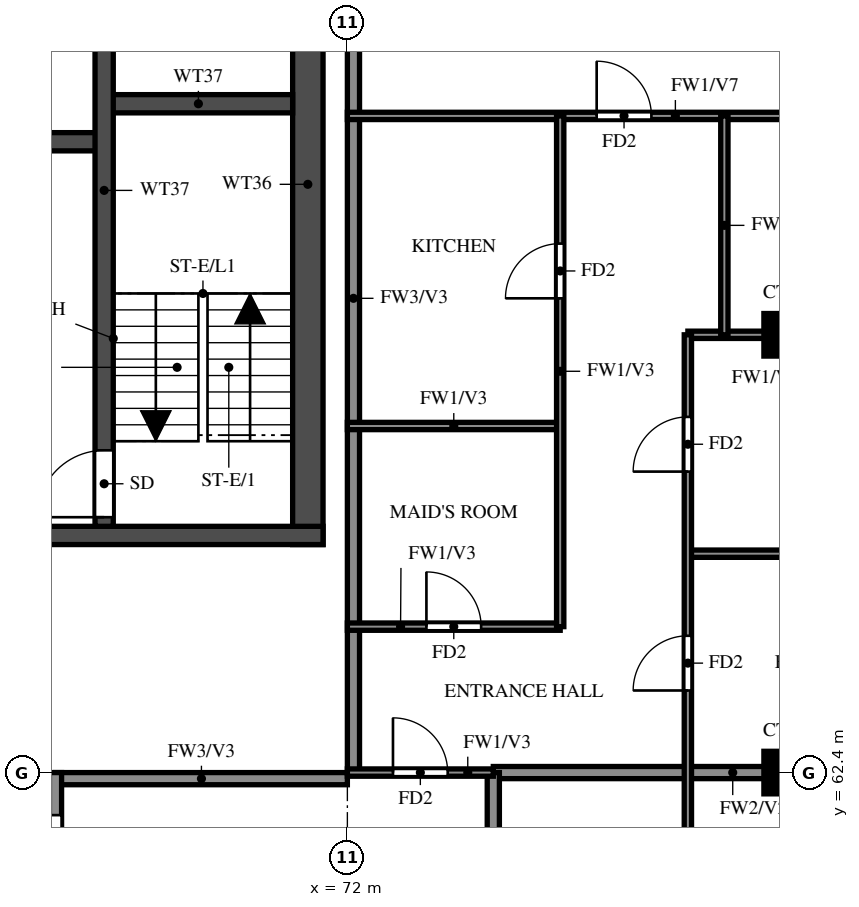
"""IFC4 building model, lengths in metres.
Left out: names, types, materials, properties, quantities, classifications, styles, units other than length and angle.
Written with IfcOpenShell. Run it as: python <this file> out.ifc"""

import sys

from ifc_helpers import new_model, si_unit, direction, frame, frame_2d, origin, origin_2d, place, context, subcontext, project, spatial, rectangle, extrude, source, transform, mapped, element, fill, save


model = new_model("IFC4")
c1 = context("Model", 3, precision=1e-05, world=origin(), true_north=direction((0.0, 1.0)))
c2 = subcontext(c1, "Body", "Model", "MODEL_VIEW")
j1 = project(units=[si_unit("LENGTHUNIT", "METRE"), si_unit("PLANEANGLEUNIT", "RADIAN")], contexts=[c1])
p1 = place(None, origin())
s1 = spatial("IfcSite", under=j1, at=p1, CompositionType="ELEMENT")
p2 = place(p1, origin())
s2 = spatial("IfcBuilding", under=s1, at=p2, CompositionType="ELEMENT")
p3 = place(p2, frame((0.0, 0.0, 264.0)))
s3 = spatial("IfcBuildingStorey", under=s2, at=p3, CompositionType="ELEMENT", Elevation=264.0)
m1 = source(origin(), c2, "Body", "SweptSolid", [
    extrude(rectangle(XDim=0.7, YDim=0.7, at=origin_2d()), origin(), (0.0, 0.0, 1.0), 3.22),
])
for number, where, z_axis, x_axis in (
    (1, (79.2, 62.4, 0.0), (0.0, 0.0, 1.0), (1.0, 0.0, 0.0)),
    (2, (79.2, 69.6, 0.0), (0.0, 0.0, 1.0), (1.0, 0.0, 0.0)),
):
    element("IfcColumn", number, at=place(p3, frame(where, z_axis=z_axis, x_axis=x_axis)), inside=s3, PredefinedType="COLUMN", context=c2, shape_type="MappedRepresentation", body=[
        mapped(m1, transform((0.0, 0.0, 0.0))),
    ])
p4 = place(p3, frame((71.35, 66.15, 0.0), z_axis=(0.0, 0.0, 1.0), x_axis=(0.0, 1.0, 0.0)))
e3 = element("IfcWall", 3, at=p4, inside=s3, PredefinedType="SHEAR", context=c2, shape_type="SweptSolid", body=[
    extrude(rectangle(XDim=11.85, YDim=0.5, at=frame_2d((5.925, 0.0))), origin(), (0.0, 0.0, 1.0), 3.22),
])
p5 = place(p3, frame((29.2, 66.3, 0.0), z_axis=(0.0, 0.0, 1.0), x_axis=(1.0, 0.0, 0.0)))
e4 = element("IfcWall", 4, at=p5, inside=s3, PredefinedType="SHEAR", context=c2, shape_type="SweptSolid", body=[
    extrude(rectangle(XDim=42.4, YDim=0.3, at=frame_2d((21.2, 0.0))), origin(), (0.0, 0.0, 1.0), 3.22),
])
p6 = place(p5, frame((1.425, 0.0, 0.0)))
e5 = element("IfcOpeningElement", 5, at=p6, cuts=e4, PredefinedType="OPENING", context=c2, shape_type="SweptSolid", body=[
    extrude(rectangle(XDim=1.1, YDim=2.1, at=frame_2d((0.55, 1.05))), frame((0.0, 0.16, 0.0), z_axis=(0.0, -1.0, 0.0), x_axis=(1.0, 0.0, 0.0)), (0.0, 0.0, 1.0), 0.32),
])
p7 = place(p5, frame((4.2, 0.0, 0.0)))
e6 = element("IfcOpeningElement", 6, at=p7, cuts=e4, PredefinedType="OPENING", context=c2, shape_type="SweptSolid", body=[
    extrude(rectangle(XDim=1.8, YDim=2.1, at=frame_2d((0.9, 1.05))), frame((0.0, 0.16, 0.0), z_axis=(0.0, -1.0, 0.0), x_axis=(1.0, 0.0, 0.0)), (0.0, 0.0, 1.0), 0.32),
])
p8 = place(p3, frame((32.8, 72.775, 0.0), z_axis=(0.0, 0.0, 1.0), x_axis=(1.0, 0.0, 0.0)))
e7 = element("IfcWall", 7, at=p8, inside=s3, PredefinedType="SHEAR", context=c2, shape_type="SweptSolid", body=[
    extrude(rectangle(XDim=35.2, YDim=0.3, at=frame_2d((17.6, 0.0))), origin(), (0.0, 0.0, 1.0), 3.22),
])
p9 = place(p8, frame((19.8, 0.0, 0.0)))
e8 = element("IfcOpeningElement", 8, at=p9, cuts=e7, PredefinedType="OPENING", context=c2, shape_type="SweptSolid", body=[
    extrude(rectangle(XDim=1.1, YDim=2.1, at=frame_2d((0.55, 1.05))), frame((0.0, 0.16, 0.0), z_axis=(0.0, -1.0, 0.0), x_axis=(1.0, 0.0, 0.0)), (0.0, 0.0, 1.0), 0.32),
])
p10 = place(p8, frame((27.725, 0.0, 0.0)))
e9 = element("IfcOpeningElement", 9, at=p10, cuts=e7, PredefinedType="OPENING", context=c2, shape_type="SweptSolid", body=[
    extrude(rectangle(XDim=1.1, YDim=2.1, at=frame_2d((0.55, 1.05))), frame((0.0, 0.16, 0.0), z_axis=(0.0, -1.0, 0.0), x_axis=(1.0, 0.0, 0.0)), (0.0, 0.0, 1.0), 0.32),
])
p11 = place(p8, frame((30.325, 0.0, 0.0)))
e10 = element("IfcOpeningElement", 10, at=p11, cuts=e7, PredefinedType="OPENING", context=c2, shape_type="SweptSolid", body=[
    extrude(rectangle(XDim=1.1, YDim=2.1, at=frame_2d((0.55, 1.05))), frame((0.0, 0.16, 0.0), z_axis=(0.0, -1.0, 0.0), x_axis=(1.0, 0.0, 0.0)), (0.0, 0.0, 1.0), 0.32),
])
p12 = place(p8, frame((3.825, 0.0, 0.0)))
e11 = element("IfcOpeningElement", 11, at=p12, cuts=e7, PredefinedType="OPENING", context=c2, shape_type="SweptSolid", body=[
    extrude(rectangle(XDim=1.1, YDim=2.1, at=frame_2d((0.55, 1.05))), frame((0.0, 0.16, 0.0), z_axis=(0.0, -1.0, 0.0), x_axis=(1.0, 0.0, 0.0)), (0.0, 0.0, 1.0), 0.32),
])
p13 = place(p8, frame((6.575, 0.0, 0.0)))
e12 = element("IfcOpeningElement", 12, at=p13, cuts=e7, PredefinedType="OPENING", context=c2, shape_type="SweptSolid", body=[
    extrude(rectangle(XDim=1.1, YDim=2.1, at=frame_2d((0.55, 1.05))), frame((0.0, 0.16, 0.0), z_axis=(0.0, -1.0, 0.0), x_axis=(1.0, 0.0, 0.0)), (0.0, 0.0, 1.0), 0.32),
])
p14 = place(p8, frame((9.325, 0.0, 0.0)))
e13 = element("IfcOpeningElement", 13, at=p14, cuts=e7, PredefinedType="OPENING", context=c2, shape_type="SweptSolid", body=[
    extrude(rectangle(XDim=1.1, YDim=2.1, at=frame_2d((0.55, 1.05))), frame((0.0, 0.16, 0.0), z_axis=(0.0, -1.0, 0.0), x_axis=(1.0, 0.0, 0.0)), (0.0, 0.0, 1.0), 0.32),
])
p15 = place(p8, frame((12.075, 0.0, 0.0)))
e14 = element("IfcOpeningElement", 14, at=p15, cuts=e7, PredefinedType="OPENING", context=c2, shape_type="SweptSolid", body=[
    extrude(rectangle(XDim=1.1, YDim=2.1, at=frame_2d((0.55, 1.05))), frame((0.0, 0.16, 0.0), z_axis=(0.0, -1.0, 0.0), x_axis=(1.0, 0.0, 0.0)), (0.0, 0.0, 1.0), 0.32),
])
p16 = place(p8, frame((14.825, 0.0, 0.0)))
e15 = element("IfcOpeningElement", 15, at=p16, cuts=e7, PredefinedType="OPENING", context=c2, shape_type="SweptSolid", body=[
    extrude(rectangle(XDim=1.1, YDim=2.1, at=frame_2d((0.55, 1.05))), frame((0.0, 0.16, 0.0), z_axis=(0.0, -1.0, 0.0), x_axis=(1.0, 0.0, 0.0)), (0.0, 0.0, 1.0), 0.32),
])
p17 = place(p8, frame((17.575, 0.0, 0.0)))
e16 = element("IfcOpeningElement", 16, at=p17, cuts=e7, PredefinedType="OPENING", context=c2, shape_type="SweptSolid", body=[
    extrude(rectangle(XDim=1.1, YDim=2.1, at=frame_2d((0.55, 1.05))), frame((0.0, 0.16, 0.0), z_axis=(0.0, -1.0, 0.0), x_axis=(1.0, 0.0, 0.0)), (0.0, 0.0, 1.0), 0.32),
])
p18 = place(p8, frame((0.95, 0.0, 0.0)))
e17 = element("IfcOpeningElement", 17, at=p18, cuts=e7, PredefinedType="OPENING", context=c2, shape_type="SweptSolid", body=[
    extrude(rectangle(XDim=1.1, YDim=2.1, at=frame_2d((0.55, 1.05))), frame((0.0, 0.16, 0.0), z_axis=(0.0, -1.0, 0.0), x_axis=(1.0, 0.0, 0.0)), (0.0, 0.0, 1.0), 0.32),
])
p19 = place(p3, frame((68.0, 73.4, 0.0), z_axis=(0.0, 0.0, 1.0), x_axis=(1.0, 0.0, 0.0)))
e18 = element("IfcWall", 18, at=p19, inside=s3, PredefinedType="SHEAR", context=c2, shape_type="SweptSolid", body=[
    extrude(rectangle(XDim=3.1, YDim=0.3, at=frame_2d((1.55, 0.0))), origin(), (0.0, 0.0, 1.0), 3.22),
])
p20 = place(p3, frame((68.0, 66.45, 0.0), z_axis=(0.0, 0.0, 1.0), x_axis=(0.0, 1.0, 0.0)))
e19 = element("IfcWall", 19, at=p20, inside=s3, PredefinedType="SHEAR", context=c2, shape_type="SweptSolid", body=[
    extrude(rectangle(XDim=11.05, YDim=0.3, at=frame_2d((5.525, 0.0))), origin(), (0.0, 0.0, 1.0), 3.22),
])
p21 = place(p20, frame((0.15, 0.0, 0.0)))
e20 = element("IfcOpeningElement", 20, at=p21, cuts=e19, PredefinedType="OPENING", context=c2, shape_type="SweptSolid", body=[
    extrude(rectangle(XDim=1.1, YDim=2.1, at=frame_2d((0.55, 1.05))), frame((0.0, 0.16, 0.0), z_axis=(0.0, -1.0, 0.0), x_axis=(1.0, 0.0, 0.0)), (0.0, 0.0, 1.0), 0.32),
])
p22 = place(p3, frame((67.2, 62.3, 0.0), z_axis=(0.0, 0.0, 1.0), x_axis=(1.0, 0.0, 0.0)))
e21 = element("IfcWall", 21, at=p22, inside=s3, PredefinedType="SOLIDWALL", context=c2, shape_type="SweptSolid", body=[
    extrude(rectangle(XDim=4.8, YDim=0.2, at=frame_2d((2.4, 0.0))), origin(), (0.0, 0.0, 1.0), 3.22),
])
p23 = place(p3, frame((67.2, 45.6, 0.0), z_axis=(0.0, 0.0, 1.0), x_axis=(0.0, 1.0, 0.0)))
e22 = element("IfcWall", 22, at=p23, inside=s3, PredefinedType="SOLIDWALL", context=c2, shape_type="SweptSolid", body=[
    extrude(rectangle(XDim=16.8, YDim=0.2, at=frame_2d((8.4, 0.0))), origin(), (0.0, 0.0, 1.0), 3.22),
])
p24 = place(p23, frame((8.3, 0.0, 0.0)))
e23 = element("IfcOpeningElement", 23, at=p24, cuts=e22, PredefinedType="OPENING", context=c2, shape_type="SweptSolid", body=[
    extrude(rectangle(XDim=1.0, YDim=2.1, at=frame_2d((0.5, 1.05))), frame((0.0, 0.11, 0.0), z_axis=(0.0, -1.0, 0.0), x_axis=(1.0, 0.0, 0.0)), (0.0, 0.0, 1.0), 0.22),
])
p25 = place(p23, frame((15.1, 0.0, 0.0)))
e24 = element("IfcOpeningElement", 24, at=p25, cuts=e22, PredefinedType="OPENING", context=c2, shape_type="SweptSolid", body=[
    extrude(rectangle(XDim=1.0, YDim=2.1, at=frame_2d((0.5, 1.05))), frame((0.0, 0.11, 0.0), z_axis=(0.0, -1.0, 0.0), x_axis=(1.0, 0.0, 0.0)), (0.0, 0.0, 1.0), 0.22),
])
p26 = place(p23, frame((0.7, 0.0, 0.0)))
e25 = element("IfcOpeningElement", 25, at=p26, cuts=e22, PredefinedType="OPENING", context=c2, shape_type="SweptSolid", body=[
    extrude(rectangle(XDim=1.0, YDim=2.1, at=frame_2d((0.5, 1.05))), frame((0.0, 0.11, 0.0), z_axis=(0.0, -1.0, 0.0), x_axis=(1.0, 0.0, 0.0)), (0.0, 0.0, 1.0), 0.22),
])
p27 = place(p3, frame((72.1, 62.4, 0.0), z_axis=(0.0, 0.0, 1.0), x_axis=(0.0, 1.0, 0.0)))
e26 = element("IfcWall", 26, at=p27, inside=s3, PredefinedType="SOLIDWALL", context=c2, shape_type="SweptSolid", body=[
    extrude(rectangle(XDim=15.6, YDim=0.2, at=frame_2d((7.8, 0.0))), origin(), (0.0, 0.0, 1.0), 3.22),
])
p28 = place(p3, frame((74.4, 62.4, 0.0), z_axis=(0.0, 0.0, 1.0), x_axis=(1.0, 0.0, 0.0)))
e27 = element("IfcWall", 27, at=p28, inside=s3, PredefinedType="SOLIDWALL", context=c2, shape_type="SweptSolid", body=[
    extrude(rectangle(XDim=7.875, YDim=0.2, at=frame_2d((3.938, 0.0))), origin(), (0.0, 0.0, 1.0), 3.22),
])
p29 = place(p3, frame((74.4, 60.0, 0.0), z_axis=(0.0, 0.0, 1.0), x_axis=(0.0, 1.0, 0.0)))
e28 = element("IfcWall", 28, at=p29, inside=s3, PredefinedType="SOLIDWALL", context=c2, shape_type="SweptSolid", body=[
    extrude(rectangle(XDim=2.4, YDim=0.2, at=frame_2d((1.2, 0.0))), origin(), (0.0, 0.0, 1.0), 3.22),
])
p30 = place(p3, frame((72.0, 62.4, 0.0), z_axis=(0.0, 0.0, 1.0), x_axis=(1.0, 0.0, 0.0)))
e29 = element("IfcWall", 29, at=p30, inside=s3, PredefinedType="PARTITIONING", context=c2, shape_type="SweptSolid", body=[
    extrude(rectangle(XDim=2.4, YDim=0.12, at=frame_2d((1.2, 0.0))), origin(), (0.0, 0.0, 1.0), 3.22),
])
p31 = place(p30, frame((0.75, 0.0, 0.0)))
e30 = element("IfcOpeningElement", 30, at=p31, cuts=e29, PredefinedType="OPENING", context=c2, shape_type="SweptSolid", body=[
    extrude(rectangle(XDim=0.9, YDim=2.1, at=frame_2d((0.45, 1.05))), frame((0.0, 0.07, 0.0), z_axis=(0.0, -1.0, 0.0), x_axis=(1.0, 0.0, 0.0)), (0.0, 0.0, 1.0), 0.14),
])
p32 = place(p3, frame((72.0, 64.8, 0.0), z_axis=(0.0, 0.0, 1.0), x_axis=(1.0, 0.0, 0.0)))
e31 = element("IfcWall", 31, at=p32, inside=s3, PredefinedType="PARTITIONING", context=c2, shape_type="SweptSolid", body=[
    extrude(rectangle(XDim=3.5, YDim=0.12, at=frame_2d((1.75, 0.0))), origin(), (0.0, 0.0, 1.0), 3.22),
])
p33 = place(p32, frame((1.3, 0.0, 0.0)))
e32 = element("IfcOpeningElement", 32, at=p33, cuts=e31, PredefinedType="OPENING", context=c2, shape_type="SweptSolid", body=[
    extrude(rectangle(XDim=0.9, YDim=2.1, at=frame_2d((0.45, 1.05))), frame((0.0, 0.07, 0.0), z_axis=(0.0, -1.0, 0.0), x_axis=(1.0, 0.0, 0.0)), (0.0, 0.0, 1.0), 0.14),
])
p34 = place(p3, frame((77.6, 66.0, 0.0), z_axis=(0.0, 0.0, 1.0), x_axis=(1.0, 0.0, 0.0)))
e33 = element("IfcWall", 33, at=p34, inside=s3, PredefinedType="PARTITIONING", context=c2, shape_type="SweptSolid", body=[
    extrude(rectangle(XDim=4.675, YDim=0.12, at=frame_2d((2.337, 0.0))), origin(), (0.0, 0.0, 1.0), 2.32),
])
p35 = place(p3, frame((72.0, 68.1, 0.0), z_axis=(0.0, 0.0, 1.0), x_axis=(1.0, 0.0, 0.0)))
e34 = element("IfcWall", 34, at=p35, inside=s3, PredefinedType="PARTITIONING", context=c2, shape_type="SweptSolid", body=[
    extrude(rectangle(XDim=3.5, YDim=0.12, at=frame_2d((1.75, 0.0))), origin(), (0.0, 0.0, 1.0), 3.22),
])
p36 = place(p3, frame((77.6, 69.6, 0.0), z_axis=(0.0, 0.0, 1.0), x_axis=(1.0, 0.0, 0.0)))
e35 = element("IfcWall", 35, at=p36, inside=s3, PredefinedType="PARTITIONING", context=c2, shape_type="SweptSolid", body=[
    extrude(rectangle(XDim=4.675, YDim=0.12, at=frame_2d((2.337, 0.0))), origin(), (0.0, 0.0, 1.0), 3.22),
])
p37 = place(p36, frame((2.337, 0.0, 0.0)))
e36 = element("IfcOpeningElement", 36, at=p37, cuts=e35, PredefinedType="OPENING", context=c2, shape_type="SweptSolid", body=[
    extrude(rectangle(XDim=0.8, YDim=2.1, at=frame_2d((0.4, 1.05))), frame((0.0, 0.07, 0.0), z_axis=(0.0, -1.0, 0.0), x_axis=(1.0, 0.0, 0.0)), (0.0, 0.0, 1.0), 0.14),
])
p38 = place(p3, frame((72.0, 73.2, 0.0), z_axis=(0.0, 0.0, 1.0), x_axis=(1.0, 0.0, 0.0)))
e37 = element("IfcWall", 37, at=p38, inside=s3, PredefinedType="PARTITIONING", context=c2, shape_type="SweptSolid", body=[
    extrude(rectangle(XDim=10.275, YDim=0.12, at=frame_2d((5.137, 0.0))), origin(), (0.0, 0.0, 1.0), 2.32),
])
p39 = place(p38, frame((4.1, 0.0, 0.0)))
e38 = element("IfcOpeningElement", 38, at=p39, cuts=e37, PredefinedType="OPENING", context=c2, shape_type="SweptSolid", body=[
    extrude(rectangle(XDim=0.9, YDim=2.1, at=frame_2d((0.45, 1.05))), frame((0.0, 0.07, 0.0), z_axis=(0.0, -1.0, 0.0), x_axis=(1.0, 0.0, 0.0)), (0.0, 0.0, 1.0), 0.14),
])
p40 = place(p3, frame((75.5, 64.8, 0.0), z_axis=(0.0, 0.0, 1.0), x_axis=(0.0, 1.0, 0.0)))
e39 = element("IfcWall", 39, at=p40, inside=s3, PredefinedType="PARTITIONING", context=c2, shape_type="SweptSolid", body=[
    extrude(rectangle(XDim=8.4, YDim=0.12, at=frame_2d((4.2, 0.0))), origin(), (0.0, 0.0, 1.0), 3.22),
])
p41 = place(p40, frame((5.4, 0.0, 0.0)))
e40 = element("IfcOpeningElement", 40, at=p41, cuts=e39, PredefinedType="OPENING", context=c2, shape_type="SweptSolid", body=[
    extrude(rectangle(XDim=0.9, YDim=2.1, at=frame_2d((0.45, 1.05))), frame((0.0, 0.07, 0.0), z_axis=(0.0, -1.0, 0.0), x_axis=(1.0, 0.0, 0.0)), (0.0, 0.0, 1.0), 0.14),
])
p42 = place(p3, frame((77.6, 48.125, 0.0), z_axis=(0.0, 0.0, 1.0), x_axis=(0.0, 1.0, 0.0)))
e41 = element("IfcWall", 41, at=p42, inside=s3, PredefinedType="PARTITIONING", context=c2, shape_type="SweptSolid", body=[
    extrude(rectangle(XDim=21.475, YDim=0.12, at=frame_2d((10.738, 0.0))), origin(), (0.0, 0.0, 1.0), 3.22),
])
p43 = place(p42, frame((1.288, 0.0, 0.0)))
e42 = element("IfcOpeningElement", 42, at=p43, cuts=e41, PredefinedType="OPENING", context=c2, shape_type="SweptSolid", body=[
    extrude(rectangle(XDim=0.9, YDim=2.1, at=frame_2d((0.45, 1.05))), frame((0.0, 0.07, 0.0), z_axis=(0.0, -1.0, 0.0), x_axis=(1.0, 0.0, 0.0)), (0.0, 0.0, 1.0), 0.14),
])
p44 = place(p42, frame((7.825, 0.0, 0.0)))
e43 = element("IfcOpeningElement", 43, at=p44, cuts=e41, PredefinedType="OPENING", context=c2, shape_type="SweptSolid", body=[
    extrude(rectangle(XDim=1.5, YDim=2.1, at=frame_2d((0.75, 1.05))), frame((0.0, 0.07, 0.0), z_axis=(0.0, -1.0, 0.0), x_axis=(1.0, 0.0, 0.0)), (0.0, 0.0, 1.0), 0.14),
])
p45 = place(p42, frame((12.025, 0.0, 0.0)))
e44 = element("IfcOpeningElement", 44, at=p45, cuts=e41, PredefinedType="OPENING", context=c2, shape_type="SweptSolid", body=[
    extrude(rectangle(XDim=0.9, YDim=2.1, at=frame_2d((0.45, 1.05))), frame((0.0, 0.07, 0.0), z_axis=(0.0, -1.0, 0.0), x_axis=(1.0, 0.0, 0.0)), (0.0, 0.0, 1.0), 0.14),
])
p46 = place(p42, frame((15.625, 0.0, 0.0)))
e45 = element("IfcOpeningElement", 45, at=p46, cuts=e41, PredefinedType="OPENING", context=c2, shape_type="SweptSolid", body=[
    extrude(rectangle(XDim=0.9, YDim=2.1, at=frame_2d((0.45, 1.05))), frame((0.0, 0.07, 0.0), z_axis=(0.0, -1.0, 0.0), x_axis=(1.0, 0.0, 0.0)), (0.0, 0.0, 1.0), 0.14),
])
p47 = place(p42, frame((19.225, 0.0, 0.0)))
e46 = element("IfcOpeningElement", 46, at=p47, cuts=e41, PredefinedType="OPENING", context=c2, shape_type="SweptSolid", body=[
    extrude(rectangle(XDim=0.9, YDim=2.1, at=frame_2d((0.45, 1.05))), frame((0.0, 0.07, 0.0), z_axis=(0.0, -1.0, 0.0), x_axis=(1.0, 0.0, 0.0)), (0.0, 0.0, 1.0), 0.14),
])
p48 = place(p3, frame((78.2, 69.6, 0.0), z_axis=(0.0, 0.0, 1.0), x_axis=(0.0, 1.0, 0.0)))
e47 = element("IfcWall", 47, at=p48, inside=s3, PredefinedType="PARTITIONING", context=c2, shape_type="SweptSolid", body=[
    extrude(rectangle(XDim=3.6, YDim=0.12, at=frame_2d((1.8, 0.0))), origin(), (0.0, 0.0, 1.0), 3.22),
])
p49 = place(p21, origin())
e48 = element("IfcDoor", 48, at=p49, inside=s3, OperationType="SINGLE_SWING_RIGHT", PredefinedType="DOOR", context=c2, shape_type="SweptSolid", body=[
    extrude(rectangle(XDim=1.1, YDim=2.1, at=frame_2d((0.55, 1.05))), frame((0.0, 0.025, 0.0), z_axis=(0.0, -1.0, 0.0), x_axis=(1.0, 0.0, 0.0)), (0.0, 0.0, 1.0), 0.05),
])
fill(e20, e48)
p50 = place(p31, origin())
e49 = element("IfcDoor", 49, at=p50, inside=s3, OperationType="SINGLE_SWING_LEFT", PredefinedType="DOOR", context=c2, shape_type="SweptSolid", body=[
    extrude(rectangle(XDim=0.9, YDim=2.1, at=frame_2d((0.45, 1.05))), frame((0.0, 0.025, 0.0), z_axis=(0.0, -1.0, 0.0), x_axis=(1.0, 0.0, 0.0)), (0.0, 0.0, 1.0), 0.05),
])
fill(e30, e49)
p51 = place(p25, origin())
e50 = element("IfcDoor", 50, at=p51, inside=s3, OperationType="SINGLE_SWING_LEFT", PredefinedType="DOOR", context=c2, shape_type="SweptSolid", body=[
    extrude(rectangle(XDim=1.0, YDim=2.1, at=frame_2d((0.5, 1.05))), frame((0.0, 0.025, 0.0), z_axis=(0.0, -1.0, 0.0), x_axis=(1.0, 0.0, 0.0)), (0.0, 0.0, 1.0), 0.05),
])
fill(e24, e50)
p52 = place(p46, origin())
e51 = element("IfcDoor", 51, at=p52, inside=s3, OperationType="SINGLE_SWING_RIGHT", PredefinedType="DOOR", context=c2, shape_type="SweptSolid", body=[
    extrude(rectangle(XDim=0.9, YDim=2.1, at=frame_2d((0.45, 1.05))), frame((0.0, 0.025, 0.0), z_axis=(0.0, -1.0, 0.0), x_axis=(1.0, 0.0, 0.0)), (0.0, 0.0, 1.0), 0.05),
])
fill(e45, e51)
p53 = place(p47, origin())
e52 = element("IfcDoor", 52, at=p53, inside=s3, OperationType="SINGLE_SWING_LEFT", PredefinedType="DOOR", context=c2, shape_type="SweptSolid", body=[
    extrude(rectangle(XDim=0.9, YDim=2.1, at=frame_2d((0.45, 1.05))), frame((0.0, 0.025, 0.0), z_axis=(0.0, -1.0, 0.0), x_axis=(1.0, 0.0, 0.0)), (0.0, 0.0, 1.0), 0.05),
])
fill(e46, e52)
p54 = place(p39, origin())
e53 = element("IfcDoor", 53, at=p54, inside=s3, OperationType="SINGLE_SWING_RIGHT", PredefinedType="DOOR", context=c2, shape_type="SweptSolid", body=[
    extrude(rectangle(XDim=0.9, YDim=2.1, at=frame_2d((0.45, 1.05))), frame((0.0, 0.025, 0.0), z_axis=(0.0, -1.0, 0.0), x_axis=(1.0, 0.0, 0.0)), (0.0, 0.0, 1.0), 0.05),
])
fill(e38, e53)
p55 = place(p33, origin())
e54 = element("IfcDoor", 54, at=p55, inside=s3, OperationType="SINGLE_SWING_LEFT", PredefinedType="DOOR", context=c2, shape_type="SweptSolid", body=[
    extrude(rectangle(XDim=0.9, YDim=2.1, at=frame_2d((0.45, 1.05))), frame((0.0, 0.025, 0.0), z_axis=(0.0, -1.0, 0.0), x_axis=(1.0, 0.0, 0.0)), (0.0, 0.0, 1.0), 0.05),
])
fill(e32, e54)
p56 = place(p41, origin())
e55 = element("IfcDoor", 55, at=p56, inside=s3, OperationType="SINGLE_SWING_LEFT", PredefinedType="DOOR", context=c2, shape_type="SweptSolid", body=[
    extrude(rectangle(XDim=0.9, YDim=2.1, at=frame_2d((0.45, 1.05))), frame((0.0, 0.025, 0.0), z_axis=(0.0, -1.0, 0.0), x_axis=(1.0, 0.0, 0.0)), (0.0, 0.0, 1.0), 0.05),
])
fill(e40, e55)
save(model, sys.argv[1])
